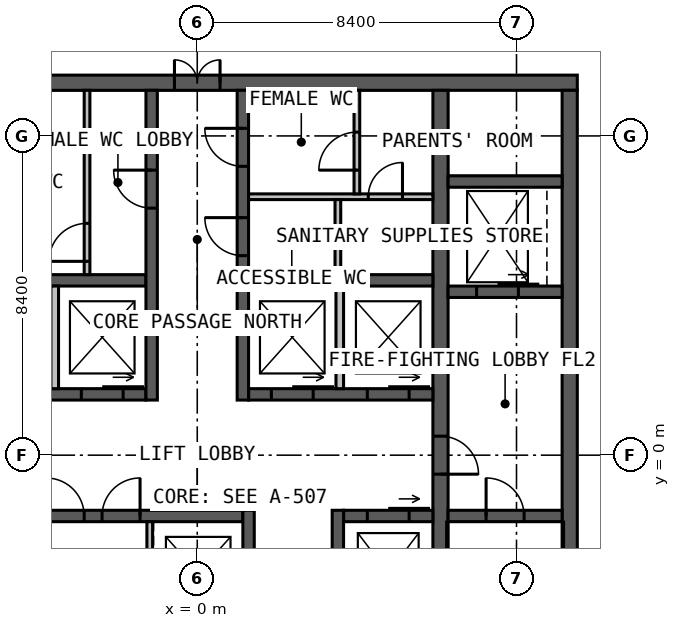
"""IFC4 building model, lengths in metres.
Left out: names, types, materials, properties, quantities, classifications, styles, units other than length and angle.
Written with IfcOpenShell. Run it as: python <this file> out.ifc"""

import sys

from ifc_helpers import new_model, si_unit, direction, frame, frame_2d, origin, place, context, subcontext, project, spatial, rectangle, extrude, element, fill, save


model = new_model("IFC4")
c1 = context("Model", 3, precision=1e-05, world=origin(), true_north=direction((0.0, 1.0)))
c2 = subcontext(c1, "Body", "Model", "MODEL_VIEW")
j1 = project(units=[si_unit("LENGTHUNIT", "METRE"), si_unit("PLANEANGLEUNIT", "RADIAN")], contexts=[c1])
p1 = place(None, origin())
s1 = spatial("IfcSite", under=j1, at=p1, CompositionType="ELEMENT")
p2 = place(p1, origin())
s2 = spatial("IfcBuilding", under=s1, at=p2, CompositionType="ELEMENT")
p3 = place(p2, frame((0.0, 0.0, 252.0)))
s3 = spatial("IfcBuildingStorey", under=s2, at=p3, CompositionType="ELEMENT", Elevation=252.0)
p4 = place(p3, frame((-10.0, 9.8, 0.0), z_axis=(0.0, 0.0, 1.0), x_axis=(1.0, 0.0, 0.0)))
e1 = element("IfcWall", 1, at=p4, inside=s3, PredefinedType="SOLIDWALL", context=c2, shape_type="SweptSolid", body=[
    extrude(rectangle(XDim=20.0, YDim=0.4, at=frame_2d((10.0, 0.0))), origin(), (0.0, 0.0, 1.0), 4.0),
])
p5 = place(p4, frame((9.4, 0.0, 0.0)))
e2 = element("IfcOpeningElement", 2, at=p5, cuts=e1, PredefinedType="OPENING", context=c2, shape_type="SweptSolid", body=[
    extrude(rectangle(XDim=1.2, YDim=2.2, at=frame_2d((0.6, 1.1))), frame((0.0, 0.21, 0.0), z_axis=(0.0, -1.0, 0.0), x_axis=(1.0, 0.0, 0.0)), (0.0, 0.0, 1.0), 0.42),
])
p6 = place(p3, frame((9.8, -9.6, 0.0), z_axis=(0.0, 0.0, 1.0), x_axis=(0.0, 1.0, 0.0)))
e3 = element("IfcWall", 3, at=p6, inside=s3, PredefinedType="SOLIDWALL", context=c2, shape_type="SweptSolid", body=[
    extrude(rectangle(XDim=19.2, YDim=0.4, at=frame_2d((9.6, 0.0))), origin(), (0.0, 0.0, 1.0), 4.0),
])
p7 = place(p3, frame((6.4, 9.6, 0.0), z_axis=(0.0, 0.0, 1.0), x_axis=(0.0, -1.0, 0.0)))
e4 = element("IfcWall", 4, at=p7, inside=s3, PredefinedType="SOLIDWALL", context=c2, shape_type="SweptSolid", body=[
    extrude(rectangle(XDim=19.2, YDim=0.4, at=frame_2d((9.6, 0.0))), origin(), (0.0, 0.0, 1.0), 4.0),
])
p8 = place(p7, frame((9.1, 0.0, 0.0)))
e5 = element("IfcOpeningElement", 5, at=p8, cuts=e4, PredefinedType="OPENING", context=c2, shape_type="SweptSolid", body=[
    extrude(rectangle(XDim=1.0, YDim=2.2, at=frame_2d((0.5, 1.1))), frame((0.0, 0.21, 0.0), z_axis=(0.0, -1.0, 0.0), x_axis=(1.0, 0.0, 0.0)), (0.0, 0.0, 1.0), 0.42),
])
p9 = place(p3, frame((-6.2, 1.6, 0.0), z_axis=(0.0, 0.0, 1.0), x_axis=(1.0, 0.0, 0.0)))
e6 = element("IfcWall", 6, at=p9, inside=s3, PredefinedType="SOLIDWALL", context=c2, shape_type="SweptSolid", body=[
    extrude(rectangle(XDim=4.85, YDim=0.3, at=frame_2d((2.425, 0.0))), origin(), (0.0, 0.0, 1.0), 4.0),
])
p10 = place(p9, frame((0.625, 0.0, 0.0)))
e7 = element("IfcOpeningElement", 7, at=p10, cuts=e6, PredefinedType="OPENING", context=c2, shape_type="SweptSolid", body=[
    extrude(rectangle(XDim=1.1, YDim=2.2, at=frame_2d((0.55, 1.1))), frame((0.0, 0.16, 0.0), z_axis=(0.0, -1.0, 0.0), x_axis=(1.0, 0.0, 0.0)), (0.0, 0.0, 1.0), 0.32),
])
p11 = place(p9, frame((3.15, 0.0, 0.0)))
e8 = element("IfcOpeningElement", 8, at=p11, cuts=e6, PredefinedType="OPENING", context=c2, shape_type="SweptSolid", body=[
    extrude(rectangle(XDim=1.1, YDim=2.2, at=frame_2d((0.55, 1.1))), frame((0.0, 0.16, 0.0), z_axis=(0.0, -1.0, 0.0), x_axis=(1.0, 0.0, 0.0)), (0.0, 0.0, 1.0), 0.32),
])
p12 = place(p3, frame((1.35, 1.6, 0.0), z_axis=(0.0, 0.0, 1.0), x_axis=(1.0, 0.0, 0.0)))
e9 = element("IfcWall", 9, at=p12, inside=s3, PredefinedType="SOLIDWALL", context=c2, shape_type="SweptSolid", body=[
    extrude(rectangle(XDim=4.85, YDim=0.3, at=frame_2d((2.425, 0.0))), origin(), (0.0, 0.0, 1.0), 4.0),
])
p13 = place(p12, frame((0.6, 0.0, 0.0)))
e10 = element("IfcOpeningElement", 10, at=p13, cuts=e9, PredefinedType="OPENING", context=c2, shape_type="SweptSolid", body=[
    extrude(rectangle(XDim=1.1, YDim=2.2, at=frame_2d((0.55, 1.1))), frame((0.0, 0.16, 0.0), z_axis=(0.0, -1.0, 0.0), x_axis=(1.0, 0.0, 0.0)), (0.0, 0.0, 1.0), 0.32),
])
p14 = place(p12, frame((3.125, 0.0, 0.0)))
e11 = element("IfcOpeningElement", 11, at=p14, cuts=e9, PredefinedType="OPENING", context=c2, shape_type="SweptSolid", body=[
    extrude(rectangle(XDim=1.1, YDim=2.2, at=frame_2d((0.55, 1.1))), frame((0.0, 0.16, 0.0), z_axis=(0.0, -1.0, 0.0), x_axis=(1.0, 0.0, 0.0)), (0.0, 0.0, 1.0), 0.32),
])
for number, where, z_axis, x_axis in (
    (12, (-6.2, 4.6, 0.0), (0.0, 0.0, 1.0), (1.0, 0.0, 0.0)),
    (13, (1.35, 4.6, 0.0), (0.0, 0.0, 1.0), (1.0, 0.0, 0.0)),
):
    element("IfcWall", number, at=place(p3, frame(where, z_axis=z_axis, x_axis=x_axis)), inside=s3, PredefinedType="SOLIDWALL", context=c2, shape_type="SweptSolid", body=[
        extrude(rectangle(XDim=4.85, YDim=0.3, at=frame_2d((2.425, 0.0))), origin(), (0.0, 0.0, 1.0), 4.0),
    ])
p15 = place(p3, frame((-1.2, 1.45, 0.0), z_axis=(0.0, 0.0, 1.0), x_axis=(0.0, 1.0, 0.0)))
e14 = element("IfcWall", 14, at=p15, inside=s3, PredefinedType="SOLIDWALL", context=c2, shape_type="SweptSolid", body=[
    extrude(rectangle(XDim=8.15, YDim=0.3, at=frame_2d((4.075, 0.0))), origin(), (0.0, 0.0, 1.0), 4.0),
])
p16 = place(p15, frame((5.05, 0.0, 0.0)))
e15 = element("IfcOpeningElement", 15, at=p16, cuts=e14, PredefinedType="OPENING", context=c2, shape_type="SweptSolid", body=[
    extrude(rectangle(XDim=1.0, YDim=2.2, at=frame_2d((0.5, 1.1))), frame((0.0, 0.16, 0.0), z_axis=(0.0, -1.0, 0.0), x_axis=(1.0, 0.0, 0.0)), (0.0, 0.0, 1.0), 0.32),
])
p17 = place(p3, frame((1.2, 1.45, 0.0), z_axis=(0.0, 0.0, 1.0), x_axis=(0.0, 1.0, 0.0)))
e16 = element("IfcWall", 16, at=p17, inside=s3, PredefinedType="SOLIDWALL", context=c2, shape_type="SweptSolid", body=[
    extrude(rectangle(XDim=8.15, YDim=0.3, at=frame_2d((4.075, 0.0))), origin(), (0.0, 0.0, 1.0), 4.0),
])
p18 = place(p17, frame((3.8, 0.0, 0.0)))
e17 = element("IfcOpeningElement", 17, at=p18, cuts=e16, PredefinedType="OPENING", context=c2, shape_type="SweptSolid", body=[
    extrude(rectangle(XDim=1.0, YDim=2.2, at=frame_2d((0.5, 1.1))), frame((0.0, 0.16, 0.0), z_axis=(0.0, -1.0, 0.0), x_axis=(1.0, 0.0, 0.0)), (0.0, 0.0, 1.0), 0.32),
])
p19 = place(p17, frame((6.15, 0.0, 0.0)))
e18 = element("IfcOpeningElement", 18, at=p19, cuts=e16, PredefinedType="OPENING", context=c2, shape_type="SweptSolid", body=[
    extrude(rectangle(XDim=1.0, YDim=2.2, at=frame_2d((0.5, 1.1))), frame((0.0, 0.16, 0.0), z_axis=(0.0, -1.0, 0.0), x_axis=(1.0, 0.0, 0.0)), (0.0, 0.0, 1.0), 0.32),
])
p20 = place(p3, frame((-6.2, -1.6, 0.0), z_axis=(0.0, 0.0, 1.0), x_axis=(1.0, 0.0, 0.0)))
e19 = element("IfcWall", 19, at=p20, inside=s3, PredefinedType="SOLIDWALL", context=c2, shape_type="SweptSolid", body=[
    extrude(rectangle(XDim=7.4, YDim=0.3, at=frame_2d((3.7, 0.0))), origin(), (0.0, 0.0, 1.0), 4.0),
])
p21 = place(p20, frame((0.675, 0.0, 0.0)))
e20 = element("IfcOpeningElement", 20, at=p21, cuts=e19, PredefinedType="OPENING", context=c2, shape_type="SweptSolid", body=[
    extrude(rectangle(XDim=1.0, YDim=2.2, at=frame_2d((0.5, 1.1))), frame((0.0, 0.16, 0.0), z_axis=(0.0, -1.0, 0.0), x_axis=(1.0, 0.0, 0.0)), (0.0, 0.0, 1.0), 0.32),
])
p22 = place(p20, frame((2.225, 0.0, 0.0)))
e21 = element("IfcOpeningElement", 21, at=p22, cuts=e19, PredefinedType="OPENING", context=c2, shape_type="SweptSolid", body=[
    extrude(rectangle(XDim=1.0, YDim=2.2, at=frame_2d((0.5, 1.1))), frame((0.0, 0.16, 0.0), z_axis=(0.0, -1.0, 0.0), x_axis=(1.0, 0.0, 0.0)), (0.0, 0.0, 1.0), 0.32),
])
p23 = place(p20, frame((3.695, 0.0, 0.0)))
e22 = element("IfcOpeningElement", 22, at=p23, cuts=e19, PredefinedType="OPENING", context=c2, shape_type="SweptSolid", body=[
    extrude(rectangle(XDim=1.0, YDim=2.2, at=frame_2d((0.5, 1.1))), frame((0.0, 0.16, 0.0), z_axis=(0.0, -1.0, 0.0), x_axis=(1.0, 0.0, 0.0)), (0.0, 0.0, 1.0), 0.32),
])
p24 = place(p3, frame((3.85, -1.6, 0.0), z_axis=(0.0, 0.0, 1.0), x_axis=(1.0, 0.0, 0.0)))
e23 = element("IfcWall", 23, at=p24, inside=s3, PredefinedType="SOLIDWALL", context=c2, shape_type="SweptSolid", body=[
    extrude(rectangle(XDim=2.35, YDim=0.3, at=frame_2d((1.175, 0.0))), origin(), (0.0, 0.0, 1.0), 4.0),
])
p25 = place(p24, frame((0.625, 0.0, 0.0)))
e24 = element("IfcOpeningElement", 24, at=p25, cuts=e23, PredefinedType="OPENING", context=c2, shape_type="SweptSolid", body=[
    extrude(rectangle(XDim=1.1, YDim=2.2, at=frame_2d((0.55, 1.1))), frame((0.0, 0.16, 0.0), z_axis=(0.0, -1.0, 0.0), x_axis=(1.0, 0.0, 0.0)), (0.0, 0.0, 1.0), 0.32),
])
p26 = place(p3, frame((1.35, -1.45, 0.0), z_axis=(0.0, 0.0, 1.0), x_axis=(0.0, -1.0, 0.0)))
e25 = element("IfcWall", 25, at=p26, inside=s3, PredefinedType="SOLIDWALL", context=c2, shape_type="SweptSolid", body=[
    extrude(rectangle(XDim=8.15, YDim=0.3, at=frame_2d((4.075, 0.0))), origin(), (0.0, 0.0, 1.0), 4.0),
])
p27 = place(p26, frame((6.0, 0.0, 0.0)))
e26 = element("IfcOpeningElement", 26, at=p27, cuts=e25, PredefinedType="OPENING", context=c2, shape_type="SweptSolid", body=[
    extrude(rectangle(XDim=1.0, YDim=2.2, at=frame_2d((0.5, 1.1))), frame((0.0, 0.16, 0.0), z_axis=(0.0, -1.0, 0.0), x_axis=(1.0, 0.0, 0.0)), (0.0, 0.0, 1.0), 0.32),
])
p28 = place(p26, frame((3.525, 0.0, 0.0)))
e27 = element("IfcOpeningElement", 27, at=p28, cuts=e25, PredefinedType="OPENING", context=c2, shape_type="SweptSolid", body=[
    extrude(rectangle(XDim=0.9, YDim=2.2, at=frame_2d((0.45, 1.1))), frame((0.0, 0.16, 0.0), z_axis=(0.0, -1.0, 0.0), x_axis=(1.0, 0.0, 0.0)), (0.0, 0.0, 1.0), 0.32),
])
p29 = place(p3, frame((3.7, -1.45, 0.0), z_axis=(0.0, 0.0, 1.0), x_axis=(0.0, -1.0, 0.0)))
e28 = element("IfcWall", 28, at=p29, inside=s3, PredefinedType="SOLIDWALL", context=c2, shape_type="SweptSolid", body=[
    extrude(rectangle(XDim=8.15, YDim=0.3, at=frame_2d((4.075, 0.0))), origin(), (0.0, 0.0, 1.0), 4.0),
])
p30 = place(p29, frame((5.1, 0.0, 0.0)))
e29 = element("IfcOpeningElement", 29, at=p30, cuts=e28, PredefinedType="OPENING", context=c2, shape_type="SweptSolid", body=[
    extrude(rectangle(XDim=0.9, YDim=2.2, at=frame_2d((0.45, 1.1))), frame((0.0, 0.16, 0.0), z_axis=(0.0, -1.0, 0.0), x_axis=(1.0, 0.0, 0.0)), (0.0, 0.0, 1.0), 0.32),
])
p31 = place(p3, frame((6.6, -1.6, 0.0), z_axis=(0.0, 0.0, 1.0), x_axis=(1.0, 0.0, 0.0)))
e30 = element("IfcWall", 30, at=p31, inside=s3, PredefinedType="SOLIDWALL", context=c2, shape_type="SweptSolid", body=[
    extrude(rectangle(XDim=3.0, YDim=0.3, at=frame_2d((1.5, 0.0))), origin(), (0.0, 0.0, 1.0), 4.0),
])
p32 = place(p31, frame((1.0, 0.0, 0.0)))
e31 = element("IfcOpeningElement", 31, at=p32, cuts=e30, PredefinedType="OPENING", context=c2, shape_type="SweptSolid", body=[
    extrude(rectangle(XDim=1.0, YDim=2.2, at=frame_2d((0.5, 1.1))), frame((0.0, 0.16, 0.0), z_axis=(0.0, -1.0, 0.0), x_axis=(1.0, 0.0, 0.0)), (0.0, 0.0, 1.0), 0.32),
])
p33 = place(p3, frame((6.6, 4.3, 0.0), z_axis=(0.0, 0.0, 1.0), x_axis=(1.0, 0.0, 0.0)))
e32 = element("IfcWall", 32, at=p33, inside=s3, PredefinedType="SOLIDWALL", context=c2, shape_type="SweptSolid", body=[
    extrude(rectangle(XDim=3.0, YDim=0.3, at=frame_2d((1.5, 0.0))), origin(), (0.0, 0.0, 1.0), 4.0),
])
p34 = place(p33, frame((0.75, 0.0, 0.0)))
e33 = element("IfcOpeningElement", 33, at=p34, cuts=e32, PredefinedType="OPENING", context=c2, shape_type="SweptSolid", body=[
    extrude(rectangle(XDim=1.1, YDim=2.2, at=frame_2d((0.55, 1.1))), frame((0.0, 0.16, 0.0), z_axis=(0.0, -1.0, 0.0), x_axis=(1.0, 0.0, 0.0)), (0.0, 0.0, 1.0), 0.32),
])
p35 = place(p3, frame((6.6, 7.2, 0.0), z_axis=(0.0, 0.0, 1.0), x_axis=(1.0, 0.0, 0.0)))
e34 = element("IfcWall", 34, at=p35, inside=s3, PredefinedType="SOLIDWALL", context=c2, shape_type="SweptSolid", body=[
    extrude(rectangle(XDim=3.0, YDim=0.3, at=frame_2d((1.5, 0.0))), origin(), (0.0, 0.0, 1.0), 4.0),
])
for number, where, z_axis, x_axis in (
    (35, (-3.75, 1.75, 0.0), (0.0, 0.0, 1.0), (0.0, 1.0, 0.0)),
    (36, (3.75, 1.75, 0.0), (0.0, 0.0, 1.0), (0.0, 1.0, 0.0)),
):
    element("IfcWall", number, at=place(p3, frame(where, z_axis=z_axis, x_axis=x_axis)), inside=s3, PredefinedType="SOLIDWALL", context=c2, shape_type="SweptSolid", body=[
        extrude(rectangle(XDim=2.7, YDim=0.2, at=frame_2d((1.35, 0.0))), origin(), (0.0, 0.0, 1.0), 3.75),
    ])
p36 = place(p3, frame((1.35, 6.8, 0.0), z_axis=(0.0, 0.0, 1.0), x_axis=(1.0, 0.0, 0.0)))
e37 = element("IfcWall", 37, at=p36, inside=s3, PredefinedType="PARTITIONING", context=c2, shape_type="SweptSolid", body=[
    extrude(rectangle(XDim=4.85, YDim=0.15, at=frame_2d((2.425, 0.0))), origin(), (0.0, 0.0, 1.0), 3.75),
])
p37 = place(p36, frame((3.15, 0.0, 0.0)))
e38 = element("IfcOpeningElement", 38, at=p37, cuts=e37, PredefinedType="OPENING", context=c2, shape_type="SweptSolid", body=[
    extrude(rectangle(XDim=0.9, YDim=2.2, at=frame_2d((0.45, 1.1))), frame((0.0, 0.085, 0.0), z_axis=(0.0, -1.0, 0.0), x_axis=(1.0, 0.0, 0.0)), (0.0, 0.0, 1.0), 0.17),
])
p38 = place(p3, frame((3.7, 4.75, 0.0), z_axis=(0.0, 0.0, 1.0), x_axis=(0.0, 1.0, 0.0)))
e39 = element("IfcWall", 39, at=p38, inside=s3, PredefinedType="PARTITIONING", context=c2, shape_type="SweptSolid", body=[
    extrude(rectangle(XDim=1.975, YDim=0.15, at=frame_2d((0.988, 0.0))), origin(), (0.0, 0.0, 1.0), 3.75),
])
p39 = place(p3, frame((4.2, 6.875, 0.0), z_axis=(0.0, 0.0, 1.0), x_axis=(0.0, 1.0, 0.0)))
e40 = element("IfcWall", 40, at=p39, inside=s3, PredefinedType="PARTITIONING", context=c2, shape_type="SweptSolid", body=[
    extrude(rectangle(XDim=2.725, YDim=0.15, at=frame_2d((1.363, 0.0))), origin(), (0.0, 0.0, 1.0), 3.75),
])
p40 = place(p39, frame((0.625, 0.0, 0.0)))
e41 = element("IfcOpeningElement", 41, at=p40, cuts=e40, PredefinedType="OPENING", context=c2, shape_type="SweptSolid", body=[
    extrude(rectangle(XDim=1.0, YDim=2.2, at=frame_2d((0.5, 1.1))), frame((0.0, 0.085, 0.0), z_axis=(0.0, -1.0, 0.0), x_axis=(1.0, 0.0, 0.0)), (0.0, 0.0, 1.0), 0.17),
])
p41 = place(p3, frame((-2.9, 4.75, 0.0), z_axis=(0.0, 0.0, 1.0), x_axis=(0.0, 1.0, 0.0)))
e42 = element("IfcWall", 42, at=p41, inside=s3, PredefinedType="PARTITIONING", context=c2, shape_type="SweptSolid", body=[
    extrude(rectangle(XDim=4.85, YDim=0.15, at=frame_2d((2.425, 0.0))), origin(), (0.0, 0.0, 1.0), 3.75),
])
p42 = place(p41, frame((0.35, 0.0, 0.0)))
e43 = element("IfcOpeningElement", 43, at=p42, cuts=e42, PredefinedType="OPENING", context=c2, shape_type="SweptSolid", body=[
    extrude(rectangle(XDim=1.0, YDim=2.2, at=frame_2d((0.5, 1.1))), frame((0.0, 0.085, 0.0), z_axis=(0.0, -1.0, 0.0), x_axis=(1.0, 0.0, 0.0)), (0.0, 0.0, 1.0), 0.17),
])
p43 = place(p3, frame((-1.25, -1.75, 0.0), z_axis=(0.0, 0.0, 1.0), x_axis=(0.0, -1.0, 0.0)))
e44 = element("IfcWall", 44, at=p43, inside=s3, PredefinedType="PARTITIONING", context=c2, shape_type="SweptSolid", body=[
    extrude(rectangle(XDim=2.7, YDim=0.15, at=frame_2d((1.35, 0.0))), origin(), (0.0, 0.0, 1.0), 3.75),
])
p44 = place(p5, origin())
e45 = element("IfcDoor", 45, at=p44, inside=s3, OperationType="DOUBLE_DOOR_SINGLE_SWING", PredefinedType="DOOR", context=c2, shape_type="SweptSolid", body=[
    extrude(rectangle(XDim=1.2, YDim=2.2, at=frame_2d((0.6, 1.1))), frame((0.0, 0.025, 0.0), z_axis=(0.0, -1.0, 0.0), x_axis=(1.0, 0.0, 0.0)), (0.0, 0.0, 1.0), 0.05),
])
fill(e2, e45)
p45 = place(p8, origin())
e46 = element("IfcDoor", 46, at=p45, inside=s3, OperationType="SINGLE_SWING_RIGHT", PredefinedType="DOOR", context=c2, shape_type="SweptSolid", body=[
    extrude(rectangle(XDim=1.0, YDim=2.2, at=frame_2d((0.5, 1.1))), frame((0.0, 0.025, 0.0), z_axis=(0.0, -1.0, 0.0), x_axis=(1.0, 0.0, 0.0)), (0.0, 0.0, 1.0), 0.05),
])
fill(e5, e46)
p46 = place(p32, origin())
e47 = element("IfcDoor", 47, at=p46, inside=s3, OperationType="SINGLE_SWING_LEFT", PredefinedType="DOOR", context=c2, shape_type="SweptSolid", body=[
    extrude(rectangle(XDim=1.0, YDim=2.2, at=frame_2d((0.5, 1.1))), frame((0.0, 0.025, 0.0), z_axis=(0.0, -1.0, 0.0), x_axis=(1.0, 0.0, 0.0)), (0.0, 0.0, 1.0), 0.05),
])
fill(e31, e47)
p47 = place(p16, origin())
e48 = element("IfcDoor", 48, at=p47, inside=s3, OperationType="SINGLE_SWING_RIGHT", PredefinedType="DOOR", context=c2, shape_type="SweptSolid", body=[
    extrude(rectangle(XDim=1.0, YDim=2.2, at=frame_2d((0.5, 1.1))), frame((0.0, 0.025, 0.0), z_axis=(0.0, -1.0, 0.0), x_axis=(1.0, 0.0, 0.0)), (0.0, 0.0, 1.0), 0.05),
])
fill(e15, e48)
p48 = place(p18, origin())
e49 = element("IfcDoor", 49, at=p48, inside=s3, OperationType="SINGLE_SWING_RIGHT", PredefinedType="DOOR", context=c2, shape_type="SweptSolid", body=[
    extrude(rectangle(XDim=1.0, YDim=2.2, at=frame_2d((0.5, 1.1))), frame((0.0, 0.025, 0.0), z_axis=(0.0, -1.0, 0.0), x_axis=(1.0, 0.0, 0.0)), (0.0, 0.0, 1.0), 0.05),
])
fill(e17, e49)
p49 = place(p19, origin())
e50 = element("IfcDoor", 50, at=p49, inside=s3, OperationType="SINGLE_SWING_RIGHT", PredefinedType="DOOR", context=c2, shape_type="SweptSolid", body=[
    extrude(rectangle(XDim=1.0, YDim=2.2, at=frame_2d((0.5, 1.1))), frame((0.0, 0.025, 0.0), z_axis=(0.0, -1.0, 0.0), x_axis=(1.0, 0.0, 0.0)), (0.0, 0.0, 1.0), 0.05),
])
fill(e18, e50)
p50 = place(p37, origin())
e51 = element("IfcDoor", 51, at=p50, inside=s3, OperationType="SINGLE_SWING_RIGHT", PredefinedType="DOOR", context=c2, shape_type="SweptSolid", body=[
    extrude(rectangle(XDim=0.9, YDim=2.2, at=frame_2d((0.45, 1.1))), frame((0.0, 0.025, 0.0), z_axis=(0.0, -1.0, 0.0), x_axis=(1.0, 0.0, 0.0)), (0.0, 0.0, 1.0), 0.05),
])
fill(e38, e51)
p51 = place(p40, origin())
e52 = element("IfcDoor", 52, at=p51, inside=s3, OperationType="SINGLE_SWING_LEFT", PredefinedType="DOOR", context=c2, shape_type="SweptSolid", body=[
    extrude(rectangle(XDim=1.0, YDim=2.2, at=frame_2d((0.5, 1.1))), frame((0.0, 0.025, 0.0), z_axis=(0.0, -1.0, 0.0), x_axis=(1.0, 0.0, 0.0)), (0.0, 0.0, 1.0), 0.05),
])
fill(e41, e52)
p52 = place(p42, origin())
e53 = element("IfcDoor", 53, at=p52, inside=s3, OperationType="SINGLE_SWING_LEFT", PredefinedType="DOOR", context=c2, shape_type="SweptSolid", body=[
    extrude(rectangle(XDim=1.0, YDim=2.2, at=frame_2d((0.5, 1.1))), frame((0.0, 0.025, 0.0), z_axis=(0.0, -1.0, 0.0), x_axis=(1.0, 0.0, 0.0)), (0.0, 0.0, 1.0), 0.05),
])
fill(e43, e53)
p53 = place(p22, origin())
e54 = element("IfcDoor", 54, at=p53, inside=s3, OperationType="SINGLE_SWING_LEFT", PredefinedType="DOOR", context=c2, shape_type="SweptSolid", body=[
    extrude(rectangle(XDim=1.0, YDim=2.2, at=frame_2d((0.5, 1.1))), frame((0.0, 0.025, 0.0), z_axis=(0.0, -1.0, 0.0), x_axis=(1.0, 0.0, 0.0)), (0.0, 0.0, 1.0), 0.05),
])
fill(e21, e54)
p54 = place(p23, origin())
e55 = element("IfcDoor", 55, at=p54, inside=s3, OperationType="SINGLE_SWING_RIGHT", PredefinedType="DOOR", context=c2, shape_type="SweptSolid", body=[
    extrude(rectangle(XDim=1.0, YDim=2.2, at=frame_2d((0.5, 1.1))), frame((0.0, 0.025, 0.0), z_axis=(0.0, -1.0, 0.0), x_axis=(1.0, 0.0, 0.0)), (0.0, 0.0, 1.0), 0.05),
])
fill(e22, e55)
p55 = place(p11, origin())
e56 = element("IfcDoor", 56, at=p55, inside=s3, OperationType="SLIDING_TO_LEFT", PredefinedType="DOOR", context=c2, shape_type="SweptSolid", body=[
    extrude(rectangle(XDim=1.1, YDim=2.2, at=frame_2d((0.55, 1.1))), frame((0.0, 0.025, 0.0), z_axis=(0.0, -1.0, 0.0), x_axis=(1.0, 0.0, 0.0)), (0.0, 0.0, 1.0), 0.05),
])
fill(e8, e56)
p56 = place(p13, origin())
e57 = element("IfcDoor", 57, at=p56, inside=s3, OperationType="SLIDING_TO_LEFT", PredefinedType="DOOR", context=c2, shape_type="SweptSolid", body=[
    extrude(rectangle(XDim=1.1, YDim=2.2, at=frame_2d((0.55, 1.1))), frame((0.0, 0.025, 0.0), z_axis=(0.0, -1.0, 0.0), x_axis=(1.0, 0.0, 0.0)), (0.0, 0.0, 1.0), 0.05),
])
fill(e10, e57)
p57 = place(p14, origin())
e58 = element("IfcDoor", 58, at=p57, inside=s3, OperationType="SLIDING_TO_LEFT", PredefinedType="DOOR", context=c2, shape_type="SweptSolid", body=[
    extrude(rectangle(XDim=1.1, YDim=2.2, at=frame_2d((0.55, 1.1))), frame((0.0, 0.025, 0.0), z_axis=(0.0, -1.0, 0.0), x_axis=(1.0, 0.0, 0.0)), (0.0, 0.0, 1.0), 0.05),
])
fill(e11, e58)
p58 = place(p25, origin())
e59 = element("IfcDoor", 59, at=p58, inside=s3, OperationType="SLIDING_TO_LEFT", PredefinedType="DOOR", context=c2, shape_type="SweptSolid", body=[
    extrude(rectangle(XDim=1.1, YDim=2.2, at=frame_2d((0.55, 1.1))), frame((0.0, 0.025, 0.0), z_axis=(0.0, -1.0, 0.0), x_axis=(1.0, 0.0, 0.0)), (0.0, 0.0, 1.0), 0.05),
])
fill(e24, e59)
p59 = place(p34, origin())
e60 = element("IfcDoor", 60, at=p59, inside=s3, OperationType="SLIDING_TO_LEFT", PredefinedType="DOOR", context=c2, shape_type="SweptSolid", body=[
    extrude(rectangle(XDim=1.1, YDim=2.2, at=frame_2d((0.55, 1.1))), frame((0.0, 0.025, 0.0), z_axis=(0.0, -1.0, 0.0), x_axis=(1.0, 0.0, 0.0)), (0.0, 0.0, 1.0), 0.05),
])
fill(e33, e60)
save(model, sys.argv[1])
